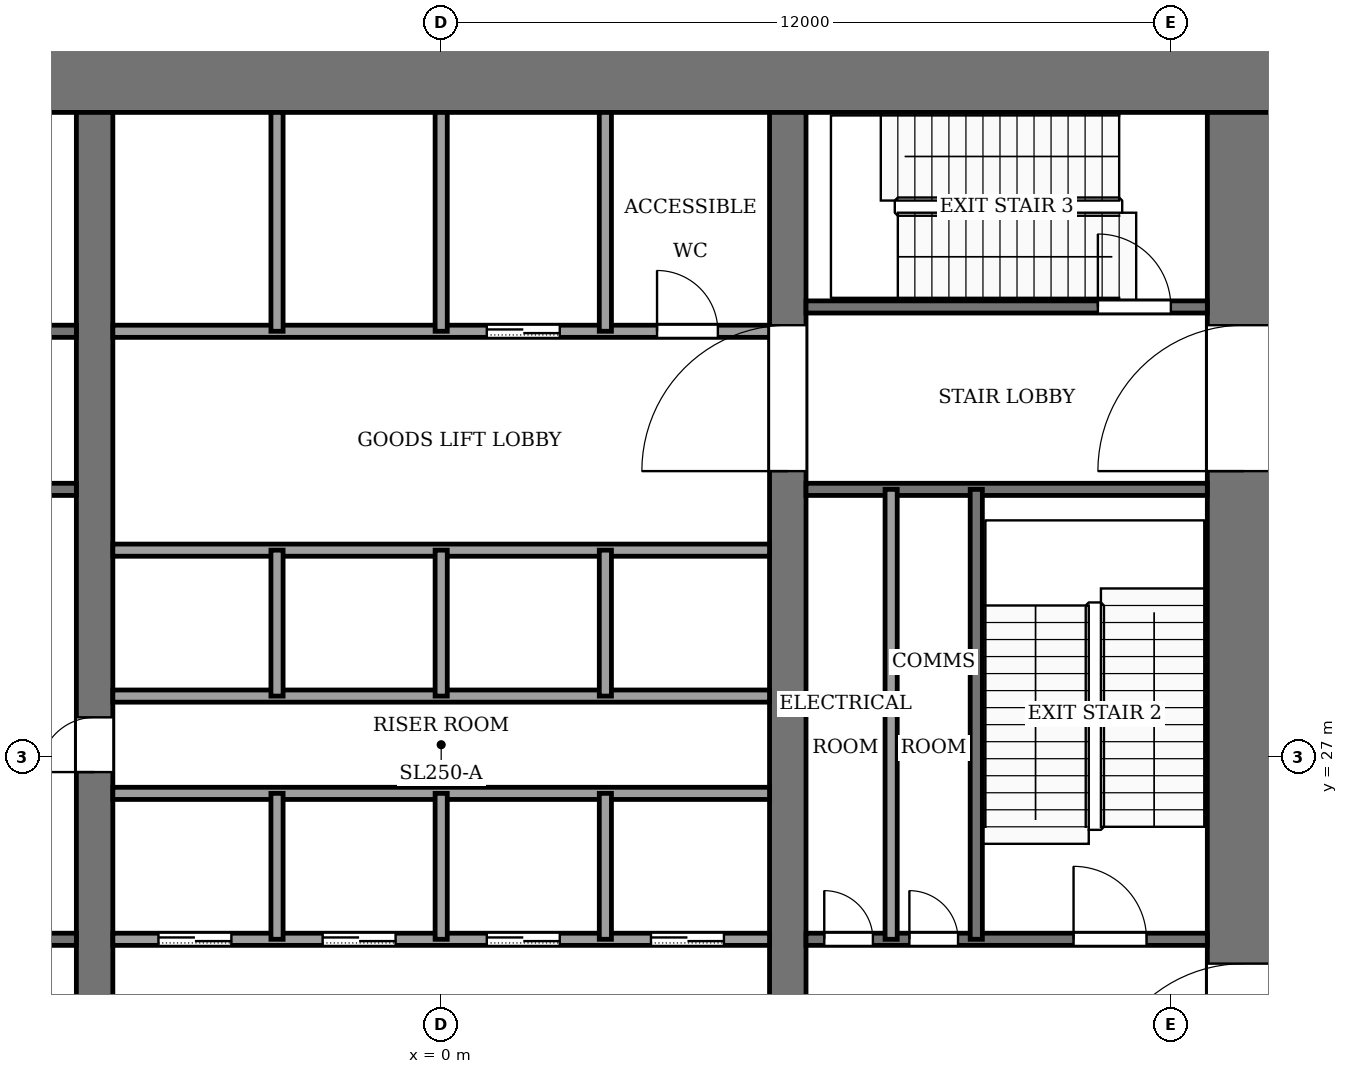
"""IFC4 building model, lengths in metres.
Left out: names, types, materials, properties, quantities, classifications, styles, units other than length and angle.
Written with IfcOpenShell. Run it as: python <this file> out.ifc"""

import sys

from ifc_helpers import new_model, si_unit, direction, frame, frame_2d, origin, place, context, subcontext, project, spatial, rectangle, extrude, element, fill, save


model = new_model("IFC4")
c1 = context("Model", 3, precision=1e-05, world=origin(), true_north=direction((0.0, 1.0)))
c2 = subcontext(c1, "Body", "Model", "MODEL_VIEW")
j1 = project(units=[si_unit("LENGTHUNIT", "METRE"), si_unit("PLANEANGLEUNIT", "RADIAN")], contexts=[c1])
p1 = place(None, origin())
s1 = spatial("IfcSite", under=j1, at=p1, CompositionType="ELEMENT")
p2 = place(p1, origin())
s2 = spatial("IfcBuilding", under=s1, at=p2, CompositionType="ELEMENT")
p3 = place(p2, frame((0.0, 0.0, 65.0)))
s3 = spatial("IfcBuildingStorey", under=s2, at=p3, CompositionType="ELEMENT", Elevation=65.0)
p4 = place(p3, frame((-13.8, 38.2, -0.13), z_axis=(0.0, 0.0, 1.0), x_axis=(1.0, 0.0, 0.0)))
e1 = element("IfcWall", 1, at=p4, inside=s3, PredefinedType="SHEAR", context=c2, shape_type="SweptSolid", body=[
    extrude(rectangle(XDim=27.6, YDim=1.2, at=frame_2d((13.8, 0.0))), origin(), (0.0, 0.0, 1.0), 5.0),
])
p5 = place(p3, frame((13.2, 18.4, -0.13), z_axis=(0.0, 0.0, 1.0), x_axis=(0.0, 1.0, 0.0)))
e2 = element("IfcWall", 2, at=p5, inside=s3, PredefinedType="SHEAR", context=c2, shape_type="SweptSolid", body=[
    extrude(rectangle(XDim=19.2, YDim=1.2, at=frame_2d((9.6, 0.0))), origin(), (0.0, 0.0, 1.0), 5.0),
])
p6 = place(p5, frame((2.8, 0.0, 0.13)))
e3 = element("IfcOpeningElement", 3, at=p6, cuts=e2, PredefinedType="OPENING", context=c2, shape_type="SweptSolid", body=[
    extrude(rectangle(XDim=2.4, YDim=2.4, at=frame_2d((1.2, 1.2))), frame((0.0, 0.61, 0.0), z_axis=(0.0, -1.0, 0.0), x_axis=(1.0, 0.0, 0.0)), (0.0, 0.0, 1.0), 1.22),
])
p7 = place(p5, frame((13.3, 0.0, 0.13)))
e4 = element("IfcOpeningElement", 4, at=p7, cuts=e2, PredefinedType="OPENING", context=c2, shape_type="SweptSolid", body=[
    extrude(rectangle(XDim=2.4, YDim=2.4, at=frame_2d((1.2, 1.2))), frame((0.0, 0.61, 0.0), z_axis=(0.0, -1.0, 0.0), x_axis=(1.0, 0.0, 0.0)), (0.0, 0.0, 1.0), 1.22),
])
p8 = place(p3, frame((-5.7, 18.4, -0.13), z_axis=(0.0, 0.0, 1.0), x_axis=(0.0, 1.0, 0.0)))
e5 = element("IfcWall", 5, at=p8, inside=s3, PredefinedType="SHEAR", context=c2, shape_type="SweptSolid", body=[
    extrude(rectangle(XDim=19.2, YDim=0.6, at=frame_2d((9.6, 0.0))), origin(), (0.0, 0.0, 1.0), 5.0),
])
p9 = place(p8, frame((8.35, 0.0, 0.13)))
e6 = element("IfcOpeningElement", 6, at=p9, cuts=e5, PredefinedType="OPENING", context=c2, shape_type="SweptSolid", body=[
    extrude(rectangle(XDim=0.9, YDim=2.1, at=frame_2d((0.45, 1.05))), frame((0.0, 0.31, 0.0), z_axis=(0.0, -1.0, 0.0), x_axis=(1.0, 0.0, 0.0)), (0.0, 0.0, 1.0), 0.62),
])
p10 = place(p3, frame((5.7, 18.4, -0.13), z_axis=(0.0, 0.0, 1.0), x_axis=(0.0, 1.0, 0.0)))
e7 = element("IfcWall", 7, at=p10, inside=s3, PredefinedType="SHEAR", context=c2, shape_type="SweptSolid", body=[
    extrude(rectangle(XDim=19.2, YDim=0.6, at=frame_2d((9.6, 0.0))), origin(), (0.0, 0.0, 1.0), 5.0),
])
p11 = place(p10, frame((13.3, 0.0, 0.13)))
e8 = element("IfcOpeningElement", 8, at=p11, cuts=e7, PredefinedType="OPENING", context=c2, shape_type="SweptSolid", body=[
    extrude(rectangle(XDim=2.4, YDim=2.4, at=frame_2d((1.2, 1.2))), frame((0.0, 0.31, 0.0), z_axis=(0.0, -1.0, 0.0), x_axis=(1.0, 0.0, 0.0)), (0.0, 0.0, 1.0), 0.62),
])
p12 = place(p3, frame((-12.6, 24.0, 0.0), z_axis=(0.0, 0.0, 1.0), x_axis=(1.0, 0.0, 0.0)))
e9 = element("IfcWall", 9, at=p12, inside=s3, PredefinedType="PARTITIONING", context=c2, shape_type="SweptSolid", body=[
    extrude(rectangle(XDim=6.6, YDim=0.2, at=frame_2d((3.3, 0.0))), origin(), (0.0, 0.0, 1.0), 4.87),
])
p13 = place(p12, frame((4.7, 0.0, 0.0)))
e10 = element("IfcOpeningElement", 10, at=p13, cuts=e9, PredefinedType="OPENING", context=c2, shape_type="SweptSolid", body=[
    extrude(rectangle(XDim=1.0, YDim=2.1, at=frame_2d((0.5, 1.05))), frame((0.0, 0.11, 0.0), z_axis=(0.0, -1.0, 0.0), x_axis=(1.0, 0.0, 0.0)), (0.0, 0.0, 1.0), 0.22),
])
p14 = place(p3, frame((-5.4, 24.0, 0.0), z_axis=(0.0, 0.0, 1.0), x_axis=(1.0, 0.0, 0.0)))
e11 = element("IfcWall", 11, at=p14, inside=s3, PredefinedType="PARTITIONING", context=c2, shape_type="SweptSolid", body=[
    extrude(rectangle(XDim=10.8, YDim=0.2, at=frame_2d((5.4, 0.0))), origin(), (0.0, 0.0, 1.0), 4.87),
])
p15 = place(p14, frame((0.75, 0.0, 0.0)))
e12 = element("IfcOpeningElement", 12, at=p15, cuts=e11, PredefinedType="OPENING", context=c2, shape_type="SweptSolid", body=[
    extrude(rectangle(XDim=1.2, YDim=2.2, at=frame_2d((0.6, 1.1))), frame((0.0, 0.11, 0.0), z_axis=(0.0, -1.0, 0.0), x_axis=(1.0, 0.0, 0.0)), (0.0, 0.0, 1.0), 0.22),
])
p16 = place(p14, frame((3.45, 0.0, 0.0)))
e13 = element("IfcOpeningElement", 13, at=p16, cuts=e11, PredefinedType="OPENING", context=c2, shape_type="SweptSolid", body=[
    extrude(rectangle(XDim=1.2, YDim=2.2, at=frame_2d((0.6, 1.1))), frame((0.0, 0.11, 0.0), z_axis=(0.0, -1.0, 0.0), x_axis=(1.0, 0.0, 0.0)), (0.0, 0.0, 1.0), 0.22),
])
p17 = place(p14, frame((6.15, 0.0, 0.0)))
e14 = element("IfcOpeningElement", 14, at=p17, cuts=e11, PredefinedType="OPENING", context=c2, shape_type="SweptSolid", body=[
    extrude(rectangle(XDim=1.2, YDim=2.2, at=frame_2d((0.6, 1.1))), frame((0.0, 0.11, 0.0), z_axis=(0.0, -1.0, 0.0), x_axis=(1.0, 0.0, 0.0)), (0.0, 0.0, 1.0), 0.22),
])
p18 = place(p14, frame((8.85, 0.0, 0.0)))
e15 = element("IfcOpeningElement", 15, at=p18, cuts=e11, PredefinedType="OPENING", context=c2, shape_type="SweptSolid", body=[
    extrude(rectangle(XDim=1.2, YDim=2.2, at=frame_2d((0.6, 1.1))), frame((0.0, 0.11, 0.0), z_axis=(0.0, -1.0, 0.0), x_axis=(1.0, 0.0, 0.0)), (0.0, 0.0, 1.0), 0.22),
])
p19 = place(p3, frame((6.0, 24.0, 0.0), z_axis=(0.0, 0.0, 1.0), x_axis=(1.0, 0.0, 0.0)))
e16 = element("IfcWall", 16, at=p19, inside=s3, PredefinedType="PARTITIONING", context=c2, shape_type="SweptSolid", body=[
    extrude(rectangle(XDim=6.6, YDim=0.2, at=frame_2d((3.3, 0.0))), origin(), (0.0, 0.0, 1.0), 4.87),
])
p20 = place(p19, frame((0.3, 0.0, 0.0)))
e17 = element("IfcOpeningElement", 17, at=p20, cuts=e16, PredefinedType="OPENING", context=c2, shape_type="SweptSolid", body=[
    extrude(rectangle(XDim=0.8, YDim=2.1, at=frame_2d((0.4, 1.05))), frame((0.0, 0.11, 0.0), z_axis=(0.0, -1.0, 0.0), x_axis=(1.0, 0.0, 0.0)), (0.0, 0.0, 1.0), 0.22),
])
p21 = place(p19, frame((1.7, 0.0, 0.0)))
e18 = element("IfcOpeningElement", 18, at=p21, cuts=e16, PredefinedType="OPENING", context=c2, shape_type="SweptSolid", body=[
    extrude(rectangle(XDim=0.8, YDim=2.1, at=frame_2d((0.4, 1.05))), frame((0.0, 0.11, 0.0), z_axis=(0.0, -1.0, 0.0), x_axis=(1.0, 0.0, 0.0)), (0.0, 0.0, 1.0), 0.22),
])
p22 = place(p19, frame((4.4, 0.0, 0.0)))
e19 = element("IfcOpeningElement", 19, at=p22, cuts=e16, PredefinedType="OPENING", context=c2, shape_type="SweptSolid", body=[
    extrude(rectangle(XDim=1.2, YDim=2.2, at=frame_2d((0.6, 1.1))), frame((0.0, 0.11, 0.0), z_axis=(0.0, -1.0, 0.0), x_axis=(1.0, 0.0, 0.0)), (0.0, 0.0, 1.0), 0.22),
])
for number, where, z_axis, x_axis in (
    (20, (-5.4, 26.4, 0.0), (0.0, 0.0, 1.0), (1.0, 0.0, 0.0)),
    (21, (-5.4, 28.0, 0.0), (0.0, 0.0, 1.0), (1.0, 0.0, 0.0)),
    (22, (-5.4, 30.4, 0.0), (0.0, 0.0, 1.0), (1.0, 0.0, 0.0)),
):
    element("IfcWall", number, at=place(p3, frame(where, z_axis=z_axis, x_axis=x_axis)), inside=s3, PredefinedType="PARTITIONING", context=c2, shape_type="SweptSolid", body=[
        extrude(rectangle(XDim=10.8, YDim=0.2, at=frame_2d((5.4, 0.0))), origin(), (0.0, 0.0, 1.0), 4.87),
    ])
p23 = place(p3, frame((-12.6, 31.4, 0.0), z_axis=(0.0, 0.0, 1.0), x_axis=(1.0, 0.0, 0.0)))
e23 = element("IfcWall", 23, at=p23, inside=s3, PredefinedType="PARTITIONING", context=c2, shape_type="SweptSolid", body=[
    extrude(rectangle(XDim=6.6, YDim=0.2, at=frame_2d((3.3, 0.0))), origin(), (0.0, 0.0, 1.0), 4.87),
])
p24 = place(p23, frame((1.0, 0.0, 0.0)))
e24 = element("IfcOpeningElement", 24, at=p24, cuts=e23, PredefinedType="OPENING", context=c2, shape_type="SweptSolid", body=[
    extrude(rectangle(XDim=1.2, YDim=2.2, at=frame_2d((0.6, 1.1))), frame((0.0, 0.11, 0.0), z_axis=(0.0, -1.0, 0.0), x_axis=(1.0, 0.0, 0.0)), (0.0, 0.0, 1.0), 0.22),
])
p25 = place(p3, frame((6.0, 31.4, 0.0), z_axis=(0.0, 0.0, 1.0), x_axis=(1.0, 0.0, 0.0)))
e25 = element("IfcWall", 25, at=p25, inside=s3, PredefinedType="PARTITIONING", context=c2, shape_type="SweptSolid", body=[
    extrude(rectangle(XDim=6.6, YDim=0.2, at=frame_2d((3.3, 0.0))), origin(), (0.0, 0.0, 1.0), 4.87),
])
p26 = place(p3, frame((-12.6, 34.0, 0.0), z_axis=(0.0, 0.0, 1.0), x_axis=(1.0, 0.0, 0.0)))
e26 = element("IfcWall", 26, at=p26, inside=s3, PredefinedType="PARTITIONING", context=c2, shape_type="SweptSolid", body=[
    extrude(rectangle(XDim=6.6, YDim=0.2, at=frame_2d((3.3, 0.0))), origin(), (0.0, 0.0, 1.0), 4.87),
])
p27 = place(p26, frame((4.7, 0.0, 0.0)))
e27 = element("IfcOpeningElement", 27, at=p27, cuts=e26, PredefinedType="OPENING", context=c2, shape_type="SweptSolid", body=[
    extrude(rectangle(XDim=1.4, YDim=2.2, at=frame_2d((0.7, 1.1))), frame((0.0, 0.11, 0.0), z_axis=(0.0, -1.0, 0.0), x_axis=(1.0, 0.0, 0.0)), (0.0, 0.0, 1.0), 0.22),
])
p28 = place(p26, frame((2.3, 0.0, 0.0)))
e28 = element("IfcOpeningElement", 28, at=p28, cuts=e26, PredefinedType="OPENING", context=c2, shape_type="SweptSolid", body=[
    extrude(rectangle(XDim=1.4, YDim=2.2, at=frame_2d((0.7, 1.1))), frame((0.0, 0.11, 0.0), z_axis=(0.0, -1.0, 0.0), x_axis=(1.0, 0.0, 0.0)), (0.0, 0.0, 1.0), 0.22),
])
p29 = place(p26, frame((0.45, 0.0, 0.0)))
e29 = element("IfcOpeningElement", 29, at=p29, cuts=e26, PredefinedType="OPENING", context=c2, shape_type="SweptSolid", body=[
    extrude(rectangle(XDim=0.9, YDim=2.1, at=frame_2d((0.45, 1.05))), frame((0.0, 0.11, 0.0), z_axis=(0.0, -1.0, 0.0), x_axis=(1.0, 0.0, 0.0)), (0.0, 0.0, 1.0), 0.22),
])
p30 = place(p3, frame((-5.4, 34.0, 0.0), z_axis=(0.0, 0.0, 1.0), x_axis=(1.0, 0.0, 0.0)))
e30 = element("IfcWall", 30, at=p30, inside=s3, PredefinedType="PARTITIONING", context=c2, shape_type="SweptSolid", body=[
    extrude(rectangle(XDim=10.8, YDim=0.2, at=frame_2d((5.4, 0.0))), origin(), (0.0, 0.0, 1.0), 4.87),
])
p31 = place(p30, frame((6.15, 0.0, 0.0)))
e31 = element("IfcOpeningElement", 31, at=p31, cuts=e30, PredefinedType="OPENING", context=c2, shape_type="SweptSolid", body=[
    extrude(rectangle(XDim=1.2, YDim=2.2, at=frame_2d((0.6, 1.1))), frame((0.0, 0.11, 0.0), z_axis=(0.0, -1.0, 0.0), x_axis=(1.0, 0.0, 0.0)), (0.0, 0.0, 1.0), 0.22),
])
p32 = place(p30, frame((8.95, 0.0, 0.0)))
e32 = element("IfcOpeningElement", 32, at=p32, cuts=e30, PredefinedType="OPENING", context=c2, shape_type="SweptSolid", body=[
    extrude(rectangle(XDim=1.0, YDim=2.1, at=frame_2d((0.5, 1.05))), frame((0.0, 0.11, 0.0), z_axis=(0.0, -1.0, 0.0), x_axis=(1.0, 0.0, 0.0)), (0.0, 0.0, 1.0), 0.22),
])
p33 = place(p3, frame((6.0, 34.4, 0.0), z_axis=(0.0, 0.0, 1.0), x_axis=(1.0, 0.0, 0.0)))
e33 = element("IfcWall", 33, at=p33, inside=s3, PredefinedType="PARTITIONING", context=c2, shape_type="SweptSolid", body=[
    extrude(rectangle(XDim=6.6, YDim=0.2, at=frame_2d((3.3, 0.0))), origin(), (0.0, 0.0, 1.0), 4.87),
])
p34 = place(p33, frame((4.8, 0.0, 0.0)))
e34 = element("IfcOpeningElement", 34, at=p34, cuts=e33, PredefinedType="OPENING", context=c2, shape_type="SweptSolid", body=[
    extrude(rectangle(XDim=1.2, YDim=2.2, at=frame_2d((0.6, 1.1))), frame((0.0, 0.11, 0.0), z_axis=(0.0, -1.0, 0.0), x_axis=(1.0, 0.0, 0.0)), (0.0, 0.0, 1.0), 0.22),
])
for number, where, z_axis, x_axis in (
    (35, (-2.7, 24.0, 0.0), (0.0, 0.0, 1.0), (0.0, 1.0, 0.0)),
    (36, (-2.7, 28.0, 0.0), (0.0, 0.0, 1.0), (0.0, 1.0, 0.0)),
):
    element("IfcWall", number, at=place(p3, frame(where, z_axis=z_axis, x_axis=x_axis)), inside=s3, PredefinedType="PARTITIONING", context=c2, shape_type="SweptSolid", body=[
        extrude(rectangle(XDim=2.4, YDim=0.2, at=frame_2d((1.2, 0.0))), origin(), (0.0, 0.0, 1.0), 4.87),
    ])
p35 = place(p3, frame((-2.7, 34.0, 0.0), z_axis=(0.0, 0.0, 1.0), x_axis=(0.0, 1.0, 0.0)))
e37 = element("IfcWall", 37, at=p35, inside=s3, PredefinedType="PARTITIONING", context=c2, shape_type="SweptSolid", body=[
    extrude(rectangle(XDim=3.6, YDim=0.2, at=frame_2d((1.8, 0.0))), origin(), (0.0, 0.0, 1.0), 4.87),
])
for number, where, z_axis, x_axis in (
    (38, (0.0, 24.0, 0.0), (0.0, 0.0, 1.0), (0.0, 1.0, 0.0)),
    (39, (0.0, 28.0, 0.0), (0.0, 0.0, 1.0), (0.0, 1.0, 0.0)),
):
    element("IfcWall", number, at=place(p3, frame(where, z_axis=z_axis, x_axis=x_axis)), inside=s3, PredefinedType="PARTITIONING", context=c2, shape_type="SweptSolid", body=[
        extrude(rectangle(XDim=2.4, YDim=0.2, at=frame_2d((1.2, 0.0))), origin(), (0.0, 0.0, 1.0), 4.87),
    ])
p36 = place(p3, frame((0.0, 34.0, 0.0), z_axis=(0.0, 0.0, 1.0), x_axis=(0.0, 1.0, 0.0)))
e40 = element("IfcWall", 40, at=p36, inside=s3, PredefinedType="PARTITIONING", context=c2, shape_type="SweptSolid", body=[
    extrude(rectangle(XDim=3.6, YDim=0.2, at=frame_2d((1.8, 0.0))), origin(), (0.0, 0.0, 1.0), 4.87),
])
for number, where, z_axis, x_axis in (
    (41, (2.7, 24.0, 0.0), (0.0, 0.0, 1.0), (0.0, 1.0, 0.0)),
    (42, (2.7, 28.0, 0.0), (0.0, 0.0, 1.0), (0.0, 1.0, 0.0)),
):
    element("IfcWall", number, at=place(p3, frame(where, z_axis=z_axis, x_axis=x_axis)), inside=s3, PredefinedType="PARTITIONING", context=c2, shape_type="SweptSolid", body=[
        extrude(rectangle(XDim=2.4, YDim=0.2, at=frame_2d((1.2, 0.0))), origin(), (0.0, 0.0, 1.0), 4.87),
    ])
p37 = place(p3, frame((2.7, 34.0, 0.0), z_axis=(0.0, 0.0, 1.0), x_axis=(0.0, 1.0, 0.0)))
e43 = element("IfcWall", 43, at=p37, inside=s3, PredefinedType="PARTITIONING", context=c2, shape_type="SweptSolid", body=[
    extrude(rectangle(XDim=3.6, YDim=0.2, at=frame_2d((1.8, 0.0))), origin(), (0.0, 0.0, 1.0), 4.87),
])
for number, where, z_axis, x_axis in (
    (44, (7.4, 24.0, 0.0), (0.0, 0.0, 1.0), (0.0, 1.0, 0.0)),
    (45, (8.8, 24.0, 0.0), (0.0, 0.0, 1.0), (0.0, 1.0, 0.0)),
):
    element("IfcWall", number, at=place(p3, frame(where, z_axis=z_axis, x_axis=x_axis)), inside=s3, PredefinedType="PARTITIONING", context=c2, shape_type="SweptSolid", body=[
        extrude(rectangle(XDim=7.4, YDim=0.2, at=frame_2d((3.7, 0.0))), origin(), (0.0, 0.0, 1.0), 4.87),
    ])
p38 = place(p15, origin())
e46 = element("IfcDoor", 46, at=p38, inside=s3, OperationType="SLIDING_TO_LEFT", PredefinedType="DOOR", context=c2, shape_type="SweptSolid", body=[
    extrude(rectangle(XDim=1.2, YDim=2.2, at=frame_2d((0.6, 1.1))), frame((0.0, 0.025, 0.0), z_axis=(0.0, -1.0, 0.0), x_axis=(1.0, 0.0, 0.0)), (0.0, 0.0, 1.0), 0.05),
])
fill(e12, e46)
p39 = place(p16, origin())
e47 = element("IfcDoor", 47, at=p39, inside=s3, OperationType="SLIDING_TO_LEFT", PredefinedType="DOOR", context=c2, shape_type="SweptSolid", body=[
    extrude(rectangle(XDim=1.2, YDim=2.2, at=frame_2d((0.6, 1.1))), frame((0.0, 0.025, 0.0), z_axis=(0.0, -1.0, 0.0), x_axis=(1.0, 0.0, 0.0)), (0.0, 0.0, 1.0), 0.05),
])
fill(e13, e47)
p40 = place(p17, origin())
e48 = element("IfcDoor", 48, at=p40, inside=s3, OperationType="SLIDING_TO_LEFT", PredefinedType="DOOR", context=c2, shape_type="SweptSolid", body=[
    extrude(rectangle(XDim=1.2, YDim=2.2, at=frame_2d((0.6, 1.1))), frame((0.0, 0.025, 0.0), z_axis=(0.0, -1.0, 0.0), x_axis=(1.0, 0.0, 0.0)), (0.0, 0.0, 1.0), 0.05),
])
fill(e14, e48)
p41 = place(p18, origin())
e49 = element("IfcDoor", 49, at=p41, inside=s3, OperationType="SLIDING_TO_LEFT", PredefinedType="DOOR", context=c2, shape_type="SweptSolid", body=[
    extrude(rectangle(XDim=1.2, YDim=2.2, at=frame_2d((0.6, 1.1))), frame((0.0, 0.025, 0.0), z_axis=(0.0, -1.0, 0.0), x_axis=(1.0, 0.0, 0.0)), (0.0, 0.0, 1.0), 0.05),
])
fill(e15, e49)
p42 = place(p31, origin())
e50 = element("IfcDoor", 50, at=p42, inside=s3, OperationType="SLIDING_TO_LEFT", PredefinedType="DOOR", context=c2, shape_type="SweptSolid", body=[
    extrude(rectangle(XDim=1.2, YDim=2.2, at=frame_2d((0.6, 1.1))), frame((0.0, 0.025, 0.0), z_axis=(0.0, -1.0, 0.0), x_axis=(1.0, 0.0, 0.0)), (0.0, 0.0, 1.0), 0.05),
])
fill(e31, e50)
p43 = place(p20, origin())
e51 = element("IfcDoor", 51, at=p43, inside=s3, OperationType="SINGLE_SWING_RIGHT", PredefinedType="DOOR", context=c2, shape_type="SweptSolid", body=[
    extrude(rectangle(XDim=0.8, YDim=2.1, at=frame_2d((0.4, 1.05))), frame((0.0, 0.025, 0.0), z_axis=(0.0, -1.0, 0.0), x_axis=(1.0, 0.0, 0.0)), (0.0, 0.0, 1.0), 0.05),
])
fill(e17, e51)
p44 = place(p21, origin())
e52 = element("IfcDoor", 52, at=p44, inside=s3, OperationType="SINGLE_SWING_LEFT", PredefinedType="DOOR", context=c2, shape_type="SweptSolid", body=[
    extrude(rectangle(XDim=0.8, YDim=2.1, at=frame_2d((0.4, 1.05))), frame((0.0, 0.025, 0.0), z_axis=(0.0, -1.0, 0.0), x_axis=(1.0, 0.0, 0.0)), (0.0, 0.0, 1.0), 0.05),
])
fill(e18, e52)
p45 = place(p32, origin())
e53 = element("IfcDoor", 53, at=p45, inside=s3, OperationType="SINGLE_SWING_LEFT", PredefinedType="DOOR", context=c2, shape_type="SweptSolid", body=[
    extrude(rectangle(XDim=1.0, YDim=2.1, at=frame_2d((0.5, 1.05))), frame((0.0, 0.025, 0.0), z_axis=(0.0, -1.0, 0.0), x_axis=(1.0, 0.0, 0.0)), (0.0, 0.0, 1.0), 0.05),
])
fill(e32, e53)
p46 = place(p9, origin())
e54 = element("IfcDoor", 54, at=p46, inside=s3, OperationType="SINGLE_SWING_LEFT", PredefinedType="DOOR", context=c2, shape_type="SweptSolid", body=[
    extrude(rectangle(XDim=0.9, YDim=2.1, at=frame_2d((0.45, 1.05))), frame((0.0, 0.025, 0.0), z_axis=(0.0, -1.0, 0.0), x_axis=(1.0, 0.0, 0.0)), (0.0, 0.0, 1.0), 0.05),
])
fill(e6, e54)
p47 = place(p22, origin())
e55 = element("IfcDoor", 55, at=p47, inside=s3, OperationType="SINGLE_SWING_RIGHT", PredefinedType="DOOR", context=c2, shape_type="SweptSolid", body=[
    extrude(rectangle(XDim=1.2, YDim=2.2, at=frame_2d((0.6, 1.1))), frame((0.0, 0.025, 0.0), z_axis=(0.0, -1.0, 0.0), x_axis=(1.0, 0.0, 0.0)), (0.0, 0.0, 1.0), 0.05),
])
fill(e19, e55)
p48 = place(p34, origin())
e56 = element("IfcDoor", 56, at=p48, inside=s3, OperationType="SINGLE_SWING_LEFT", PredefinedType="DOOR", context=c2, shape_type="SweptSolid", body=[
    extrude(rectangle(XDim=1.2, YDim=2.2, at=frame_2d((0.6, 1.1))), frame((0.0, 0.025, 0.0), z_axis=(0.0, -1.0, 0.0), x_axis=(1.0, 0.0, 0.0)), (0.0, 0.0, 1.0), 0.05),
])
fill(e34, e56)
p49 = place(p11, origin())
e57 = element("IfcDoor", 57, at=p49, inside=s3, OperationType="DOUBLE_DOOR_SINGLE_SWING", PredefinedType="DOOR", context=c2, shape_type="SweptSolid", body=[
    extrude(rectangle(XDim=2.4, YDim=2.4, at=frame_2d((1.2, 1.2))), frame((0.0, 0.025, 0.0), z_axis=(0.0, -1.0, 0.0), x_axis=(1.0, 0.0, 0.0)), (0.0, 0.0, 1.0), 0.05),
])
fill(e8, e57)
p50 = place(p6, origin())
e58 = element("IfcDoor", 58, at=p50, inside=s3, OperationType="DOUBLE_DOOR_SINGLE_SWING", PredefinedType="DOOR", context=c2, shape_type="SweptSolid", body=[
    extrude(rectangle(XDim=2.4, YDim=2.4, at=frame_2d((1.2, 1.2))), frame((0.0, 0.025, 0.0), z_axis=(0.0, -1.0, 0.0), x_axis=(1.0, 0.0, 0.0)), (0.0, 0.0, 1.0), 0.05),
])
fill(e3, e58)
p51 = place(p7, origin())
e59 = element("IfcDoor", 59, at=p51, inside=s3, OperationType="DOUBLE_DOOR_SINGLE_SWING", PredefinedType="DOOR", context=c2, shape_type="SweptSolid", body=[
    extrude(rectangle(XDim=2.4, YDim=2.4, at=frame_2d((1.2, 1.2))), frame((0.0, 0.025, 0.0), z_axis=(0.0, -1.0, 0.0), x_axis=(1.0, 0.0, 0.0)), (0.0, 0.0, 1.0), 0.05),
])
fill(e4, e59)
save(model, sys.argv[1])
